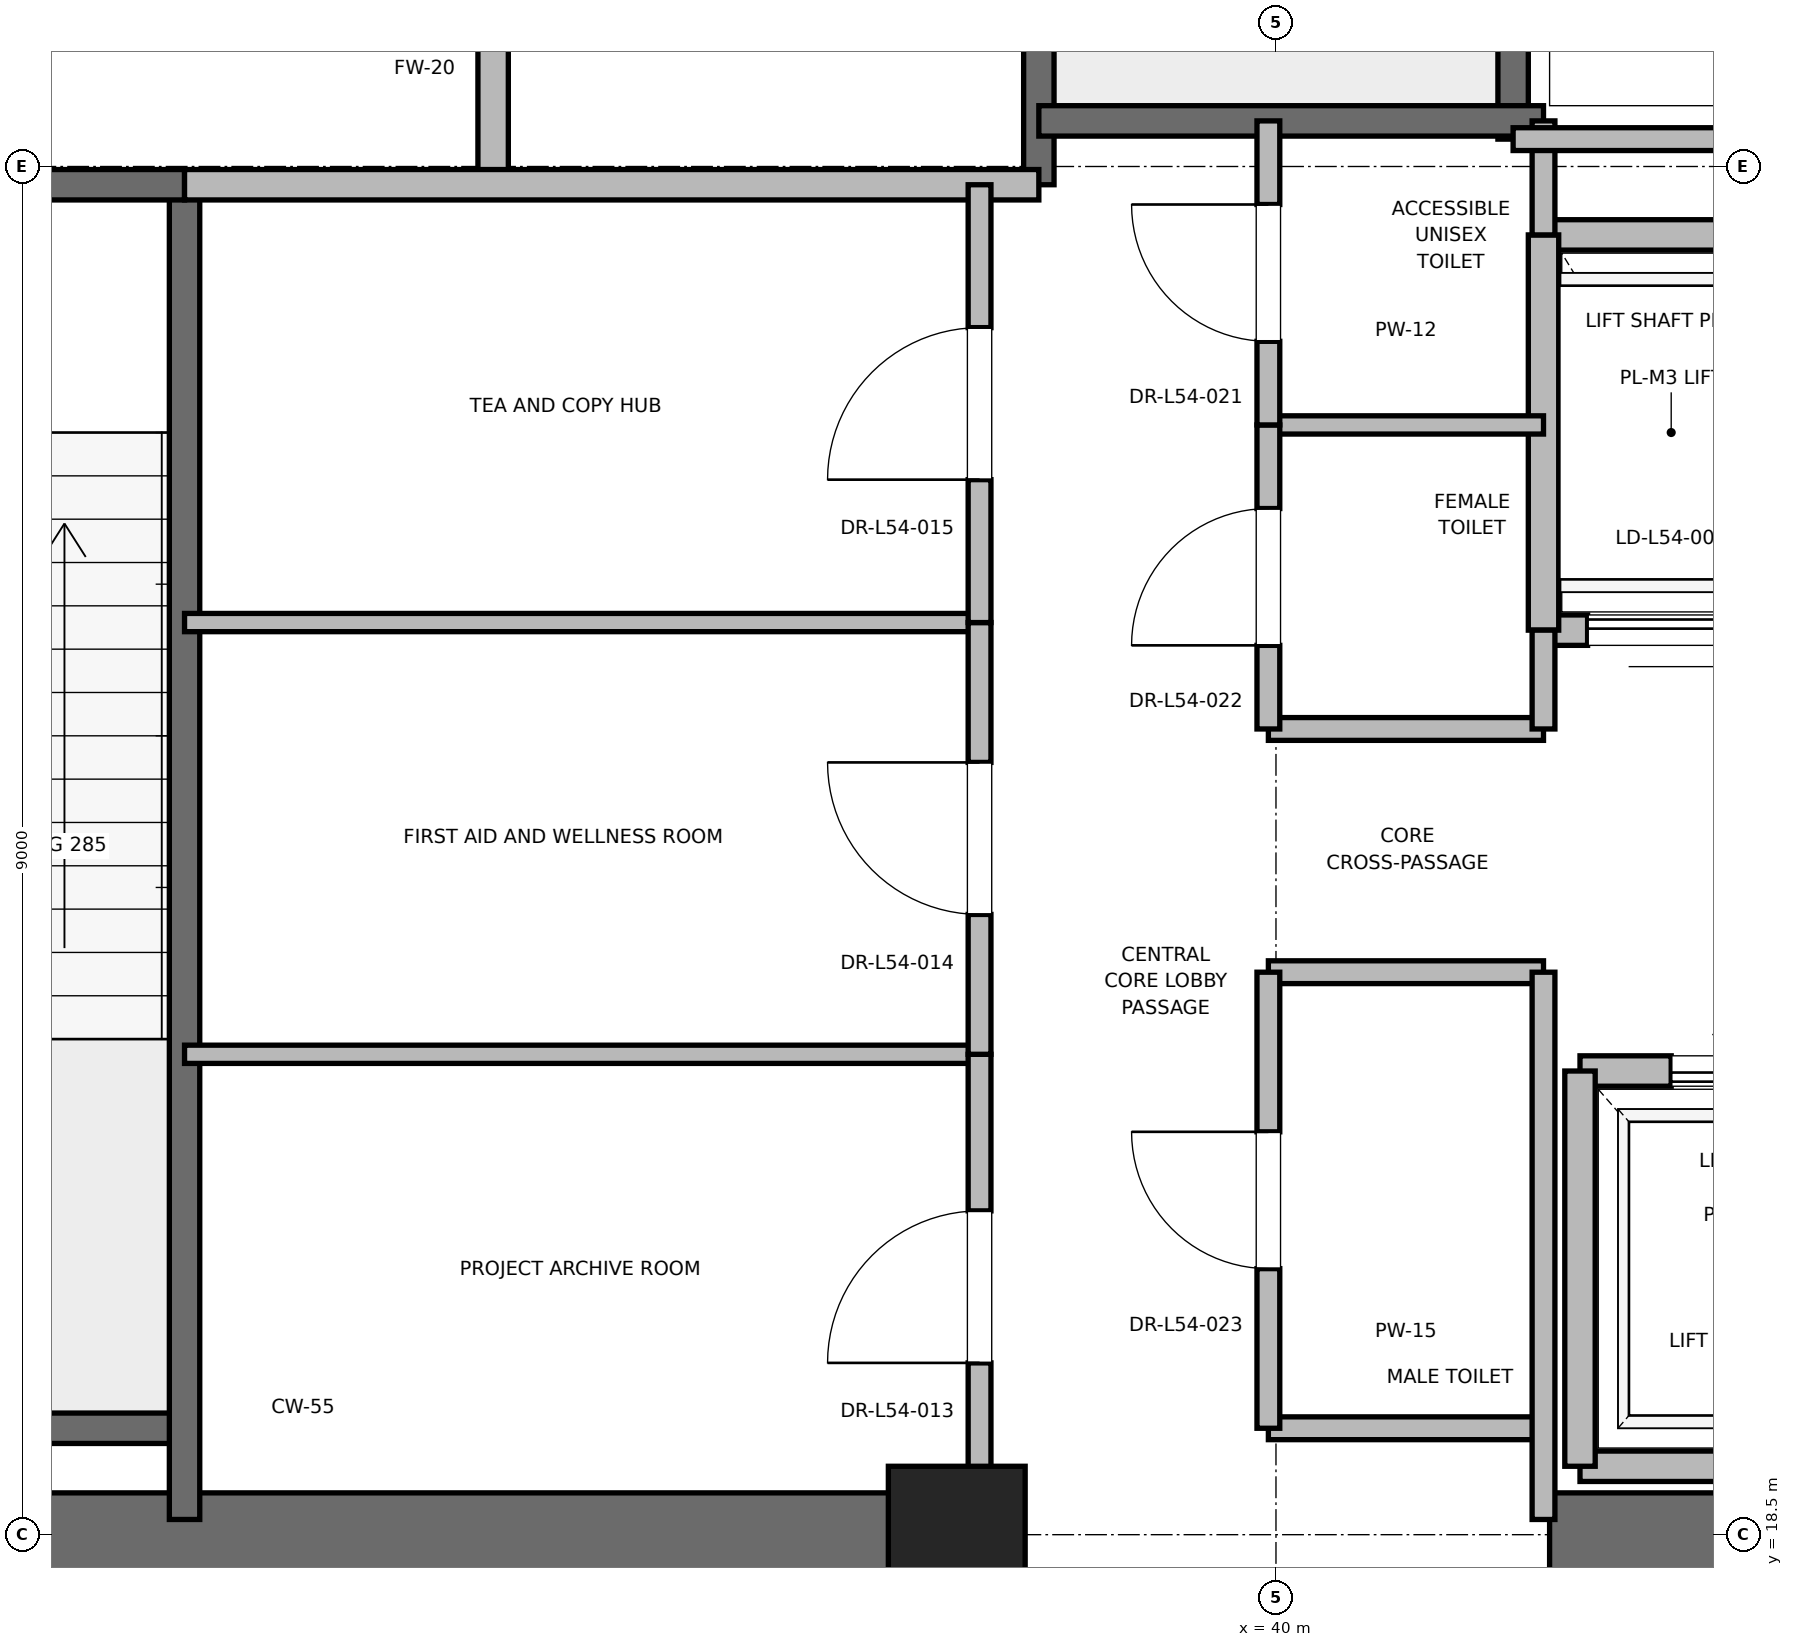
"""IFC4 building model, lengths in metres.
Left out: names, types, materials, properties, quantities, classifications, styles, units other than length and angle.
Written with IfcOpenShell. Run it as: python <this file> out.ifc"""

import sys

from ifc_helpers import new_model, si_unit, direction, frame, frame_2d, origin, origin_2d, place, context, subcontext, project, spatial, rectangle, extrude, element, fill, save


model = new_model("IFC4")
c1 = context("Model", 3, precision=1e-05, world=origin(), true_north=direction((0.0, 1.0)))
c2 = subcontext(c1, "Body", "Model", "MODEL_VIEW")
j1 = project(units=[si_unit("LENGTHUNIT", "METRE"), si_unit("PLANEANGLEUNIT", "RADIAN")], contexts=[c1])
p1 = place(None, origin())
s1 = spatial("IfcSite", under=j1, at=p1, CompositionType="ELEMENT")
p2 = place(p1, origin())
s2 = spatial("IfcBuilding", under=s1, at=p2, CompositionType="ELEMENT")
p3 = place(p2, frame((0.0, 0.0, 233.2)))
s3 = spatial("IfcBuildingStorey", under=s2, at=p3, CompositionType="ELEMENT", Elevation=233.2)
p4 = place(p3, frame((37.9, 18.5, 0.0), z_axis=(0.0, 0.0, 1.0), x_axis=(1.0, 0.0, 0.0)))
e1 = element("IfcColumn", 1, at=p4, inside=s3, PredefinedType="PILASTER", context=c2, shape_type="SweptSolid", body=[
    extrude(rectangle(XDim=0.9, YDim=0.9, at=origin_2d()), origin(), (0.0, 0.0, 1.0), 5.0),
])
for number, where, z_axis, x_axis in (
    (2, (29.0, 18.5, 0.0), (0.0, 0.0, 1.0), (1.0, 0.0, 0.0)),
    (3, (41.8, 18.5, 0.0), (0.0, 0.0, 1.0), (1.0, 0.0, 0.0)),
):
    element("IfcWall", number, at=place(p3, frame(where, z_axis=z_axis, x_axis=x_axis)), inside=s3, PredefinedType="SHEAR", context=c2, shape_type="SweptSolid", body=[
        extrude(rectangle(XDim=9.2, YDim=0.55, at=frame_2d((4.6, 0.0))), origin(), (0.0, 0.0, 1.0), 4.7),
    ])
p5 = place(p3, frame((29.7, 19.2, 0.0), z_axis=(0.0, 0.0, 1.0), x_axis=(1.0, 0.0, 0.0)))
e4 = element("IfcWall", 4, at=p5, inside=s3, PredefinedType="SOLIDWALL", context=c2, shape_type="SweptSolid", body=[
    extrude(rectangle(XDim=3.12, YDim=0.2, at=frame_2d((1.56, 0.0))), origin(), (0.0, 0.0, 1.0), 4.7),
])
p6 = place(p3, frame((32.82, 18.6, 0.0), z_axis=(0.0, 0.0, 1.0), x_axis=(0.0, 1.0, 0.0)))
e5 = element("IfcWall", 5, at=p6, inside=s3, PredefinedType="SOLIDWALL", context=c2, shape_type="SweptSolid", body=[
    extrude(rectangle(XDim=8.78, YDim=0.2, at=frame_2d((4.39, 0.0))), origin(), (0.0, 0.0, 1.0), 4.7),
])
p7 = place(p3, frame((29.7, 27.38, 0.0), z_axis=(0.0, 0.0, 1.0), x_axis=(1.0, 0.0, 0.0)))
e6 = element("IfcWall", 6, at=p7, inside=s3, PredefinedType="SOLIDWALL", context=c2, shape_type="SweptSolid", body=[
    extrude(rectangle(XDim=3.12, YDim=0.2, at=frame_2d((1.56, 0.0))), origin(), (0.0, 0.0, 1.0), 4.7),
])
p8 = place(p7, frame((1.01, 0.0, 0.0)))
e7 = element("IfcOpeningElement", 7, at=p8, cuts=e6, PredefinedType="OPENING", context=c2, shape_type="SweptSolid", body=[
    extrude(rectangle(XDim=1.1, YDim=2.15, at=frame_2d((0.55, 1.075))), frame((0.0, 0.1, 0.0), z_axis=(0.0, -1.0, 0.0), x_axis=(1.0, 0.0, 0.0)), (0.0, 0.0, 1.0), 0.2),
])
p9 = place(p3, frame((38.44, 27.38, 0.0), z_axis=(0.0, 0.0, 1.0), x_axis=(0.0, 1.0, 0.0)))
e8 = element("IfcWall", 8, at=p9, inside=s3, PredefinedType="SOLIDWALL", context=c2, shape_type="SweptSolid", body=[
    extrude(rectangle(XDim=8.87, YDim=0.2, at=frame_2d((4.435, 0.0))), origin(), (0.0, 0.0, 1.0), 4.7),
])
p10 = place(p3, frame((41.56, 27.68, 0.0), z_axis=(0.0, 0.0, 1.0), x_axis=(0.0, 1.0, 0.0)))
e9 = element("IfcWall", 9, at=p10, inside=s3, PredefinedType="SOLIDWALL", context=c2, shape_type="SweptSolid", body=[
    extrude(rectangle(XDim=8.57, YDim=0.2, at=frame_2d((4.285, 0.0))), origin(), (0.0, 0.0, 1.0), 4.7),
])
p11 = place(p3, frame((38.44, 27.8, 0.0), z_axis=(0.0, 0.0, 1.0), x_axis=(1.0, 0.0, 0.0)))
e10 = element("IfcWall", 10, at=p11, inside=s3, PredefinedType="SOLIDWALL", context=c2, shape_type="SweptSolid", body=[
    extrude(rectangle(XDim=3.32, YDim=0.2, at=frame_2d((1.66, 0.0))), origin(), (0.0, 0.0, 1.0), 4.7),
])
p12 = place(p3, frame((34.85, 27.38, 0.0), z_axis=(0.0, 0.0, 1.0), x_axis=(0.0, 1.0, 0.0)))
e11 = element("IfcWall", 11, at=p12, inside=s3, PredefinedType="PARTITIONING", context=c2, shape_type="SweptSolid", body=[
    extrude(rectangle(XDim=3.37, YDim=0.2, at=frame_2d((1.685, 0.0))), origin(), (0.0, 0.0, 1.0), 4.7),
])
p13 = place(p12, frame((1.11, 0.0, 0.0)))
e12 = element("IfcOpeningElement", 12, at=p13, cuts=e11, PredefinedType="OPENING", context=c2, shape_type="SweptSolid", body=[
    extrude(rectangle(XDim=1.15, YDim=2.2, at=frame_2d((0.575, 1.1))), frame((0.0, 0.1, 0.0), z_axis=(0.0, -1.0, 0.0), x_axis=(1.0, 0.0, 0.0)), (0.0, 0.0, 1.0), 0.2),
])
p14 = place(p3, frame((32.82, 27.38, 0.0), z_axis=(0.0, 0.0, 1.0), x_axis=(1.0, 0.0, 0.0)))
e13 = element("IfcWall", 13, at=p14, inside=s3, PredefinedType="PARTITIONING", context=c2, shape_type="SweptSolid", body=[
    extrude(rectangle(XDim=5.62, YDim=0.2, at=frame_2d((2.81, 0.0))), origin(), (0.0, 0.0, 1.0), 4.7),
])
p15 = place(p3, frame((42.0, 18.95, 0.0), z_axis=(0.0, 0.0, 1.0), x_axis=(1.0, 0.0, 0.0)))
e14 = element("IfcWall", 14, at=p15, inside=s3, PredefinedType="SOLIDWALL", context=c2, shape_type="SweptSolid", body=[
    extrude(rectangle(XDim=2.3, YDim=0.2, at=frame_2d((1.15, 0.0))), origin(), (0.0, 0.0, 1.0), 3.68),
])
p16 = place(p3, frame((44.3, 21.55, 0.0), z_axis=(0.0, 0.0, 1.0), x_axis=(-1.0, 0.0, 0.0)))
e15 = element("IfcWall", 15, at=p16, inside=s3, PredefinedType="SOLIDWALL", context=c2, shape_type="SweptSolid", body=[
    extrude(rectangle(XDim=2.3, YDim=0.2, at=frame_2d((1.15, 0.0))), origin(), (0.0, 0.0, 1.0), 4.7),
])
p17 = place(p16, frame((0.6, 0.0, 0.0)))
e16 = element("IfcOpeningElement", 16, at=p17, cuts=e15, PredefinedType="OPENING", context=c2, shape_type="SweptSolid", body=[
    extrude(rectangle(XDim=1.1, YDim=2.2, at=frame_2d((0.55, 1.1))), frame((0.0, 0.1, 0.0), z_axis=(0.0, -1.0, 0.0), x_axis=(1.0, 0.0, 0.0)), (0.0, 0.0, 1.0), 0.2),
])
p18 = place(p3, frame((42.0, 21.55, 0.0), z_axis=(0.0, 0.0, 1.0), x_axis=(0.0, -1.0, 0.0)))
e17 = element("IfcWall", 17, at=p18, inside=s3, PredefinedType="SOLIDWALL", context=c2, shape_type="SweptSolid", body=[
    extrude(rectangle(XDim=2.6, YDim=0.2, at=frame_2d((1.3, 0.0))), origin(), (0.0, 0.0, 1.0), 3.68),
])
p19 = place(p3, frame((41.76, 24.45, 0.0), z_axis=(0.0, 0.0, 1.0), x_axis=(1.0, 0.0, 0.0)))
e18 = element("IfcWall", 18, at=p19, inside=s3, PredefinedType="SOLIDWALL", context=c2, shape_type="SweptSolid", body=[
    extrude(rectangle(XDim=1.68, YDim=0.2, at=frame_2d((0.84, 0.0))), origin(), (0.0, 0.0, 1.0), 4.7),
])
p20 = place(p19, frame((0.29, 0.0, 0.0)))
e19 = element("IfcOpeningElement", 19, at=p20, cuts=e18, PredefinedType="OPENING", context=c2, shape_type="SweptSolid", body=[
    extrude(rectangle(XDim=1.1, YDim=2.2, at=frame_2d((0.55, 1.1))), frame((0.0, 0.1, 0.0), z_axis=(0.0, -1.0, 0.0), x_axis=(1.0, 0.0, 0.0)), (0.0, 0.0, 1.0), 0.2),
])
p21 = place(p3, frame((43.44, 27.05, 0.0), z_axis=(0.0, 0.0, 1.0), x_axis=(-1.0, 0.0, 0.0)))
e20 = element("IfcWall", 20, at=p21, inside=s3, PredefinedType="SOLIDWALL", context=c2, shape_type="SweptSolid", body=[
    extrude(rectangle(XDim=1.68, YDim=0.2, at=frame_2d((0.84, 0.0))), origin(), (0.0, 0.0, 1.0), 4.7),
])
p22 = place(p3, frame((41.76, 27.05, 0.0), z_axis=(0.0, 0.0, 1.0), x_axis=(0.0, -1.0, 0.0)))
e21 = element("IfcWall", 21, at=p22, inside=s3, PredefinedType="SOLIDWALL", context=c2, shape_type="SweptSolid", body=[
    extrude(rectangle(XDim=2.6, YDim=0.2, at=frame_2d((1.3, 0.0))), origin(), (0.0, 0.0, 1.0), 4.7),
])
for number, where, z_axis, x_axis in (
    (22, (39.95, 19.2, 0.0), (0.0, 0.0, 1.0), (1.0, 0.0, 0.0)),
    (23, (39.95, 22.2, 0.0), (0.0, 0.0, 1.0), (1.0, 0.0, 0.0)),
    (24, (39.95, 23.8, 0.0), (0.0, 0.0, 1.0), (1.0, 0.0, 0.0)),
):
    element("IfcWall", number, at=place(p3, frame(where, z_axis=z_axis, x_axis=x_axis)), inside=s3, PredefinedType="PARTITIONING", context=c2, shape_type="SweptSolid", body=[
        extrude(rectangle(XDim=1.81, YDim=0.15, at=frame_2d((0.905, 0.0))), origin(), (0.0, 0.0, 1.0), 2.85),
    ])
p23 = place(p3, frame((39.95, 25.8, 0.0), z_axis=(0.0, 0.0, 1.0), x_axis=(1.0, 0.0, 0.0)))
e25 = element("IfcWall", 25, at=p23, inside=s3, PredefinedType="PARTITIONING", context=c2, shape_type="SweptSolid", body=[
    extrude(rectangle(XDim=1.81, YDim=0.12, at=frame_2d((0.905, 0.0))), origin(), (0.0, 0.0, 1.0), 2.85),
])
p24 = place(p3, frame((41.76, 18.6, 0.0), z_axis=(0.0, 0.0, 1.0), x_axis=(0.0, 1.0, 0.0)))
e26 = element("IfcWall", 26, at=p24, inside=s3, PredefinedType="PARTITIONING", context=c2, shape_type="SweptSolid", body=[
    extrude(rectangle(XDim=3.6, YDim=0.15, at=frame_2d((1.8, 0.0))), origin(), (0.0, 0.0, 1.0), 2.85),
])
p25 = place(p3, frame((41.76, 23.8, 0.0), z_axis=(0.0, 0.0, 1.0), x_axis=(0.0, 1.0, 0.0)))
e27 = element("IfcWall", 27, at=p25, inside=s3, PredefinedType="PARTITIONING", context=c2, shape_type="SweptSolid", body=[
    extrude(rectangle(XDim=0.65, YDim=0.15, at=frame_2d((0.325, 0.0))), origin(), (0.0, 0.0, 1.0), 2.85),
])
p26 = place(p3, frame((41.76, 27.05, 0.0), z_axis=(0.0, 0.0, 1.0), x_axis=(0.0, 1.0, 0.0)))
e28 = element("IfcWall", 28, at=p26, inside=s3, PredefinedType="PARTITIONING", context=c2, shape_type="SweptSolid", body=[
    extrude(rectangle(XDim=0.75, YDim=0.15, at=frame_2d((0.375, 0.0))), origin(), (0.0, 0.0, 1.0), 2.85),
])
p27 = place(p3, frame((39.95, 19.2, 0.0), z_axis=(0.0, 0.0, 1.0), x_axis=(0.0, 1.0, 0.0)))
e29 = element("IfcWall", 29, at=p27, inside=s3, PredefinedType="PARTITIONING", context=c2, shape_type="SweptSolid", body=[
    extrude(rectangle(XDim=3.0, YDim=0.15, at=frame_2d((1.5, 0.0))), origin(), (0.0, 0.0, 1.0), 2.85),
])
p28 = place(p27, frame((1.05, 0.0, 0.0)))
e30 = element("IfcOpeningElement", 30, at=p28, cuts=e29, PredefinedType="OPENING", context=c2, shape_type="SweptSolid", body=[
    extrude(rectangle(XDim=0.9, YDim=2.1, at=frame_2d((0.45, 1.05))), frame((0.0, 0.075, 0.0), z_axis=(0.0, -1.0, 0.0), x_axis=(1.0, 0.0, 0.0)), (0.0, 0.0, 1.0), 0.15),
])
p29 = place(p3, frame((39.95, 23.8, 0.0), z_axis=(0.0, 0.0, 1.0), x_axis=(0.0, 1.0, 0.0)))
e31 = element("IfcWall", 31, at=p29, inside=s3, PredefinedType="PARTITIONING", context=c2, shape_type="SweptSolid", body=[
    extrude(rectangle(XDim=2.0, YDim=0.15, at=frame_2d((1.0, 0.0))), origin(), (0.0, 0.0, 1.0), 2.85),
])
p30 = place(p29, frame((0.55, 0.0, 0.0)))
e32 = element("IfcOpeningElement", 32, at=p30, cuts=e31, PredefinedType="OPENING", context=c2, shape_type="SweptSolid", body=[
    extrude(rectangle(XDim=0.9, YDim=2.1, at=frame_2d((0.45, 1.05))), frame((0.0, 0.075, 0.0), z_axis=(0.0, -1.0, 0.0), x_axis=(1.0, 0.0, 0.0)), (0.0, 0.0, 1.0), 0.15),
])
p31 = place(p3, frame((39.95, 25.8, 0.0), z_axis=(0.0, 0.0, 1.0), x_axis=(0.0, 1.0, 0.0)))
e33 = element("IfcWall", 33, at=p31, inside=s3, PredefinedType="PARTITIONING", context=c2, shape_type="SweptSolid", body=[
    extrude(rectangle(XDim=2.0, YDim=0.15, at=frame_2d((1.0, 0.0))), origin(), (0.0, 0.0, 1.0), 2.85),
])
p32 = place(p31, frame((0.55, 0.0, 0.0)))
e34 = element("IfcOpeningElement", 34, at=p32, cuts=e33, PredefinedType="OPENING", context=c2, shape_type="SweptSolid", body=[
    extrude(rectangle(XDim=0.9, YDim=2.1, at=frame_2d((0.45, 1.05))), frame((0.0, 0.075, 0.0), z_axis=(0.0, -1.0, 0.0), x_axis=(1.0, 0.0, 0.0)), (0.0, 0.0, 1.0), 0.15),
])
for number, where, z_axis, x_axis in (
    (35, (32.82, 21.66, 0.0), (0.0, 0.0, 1.0), (1.0, 0.0, 0.0)),
    (36, (32.82, 24.5, 0.0), (0.0, 0.0, 1.0), (1.0, 0.0, 0.0)),
):
    element("IfcWall", number, at=place(p3, frame(where, z_axis=z_axis, x_axis=x_axis)), inside=s3, PredefinedType="PARTITIONING", context=c2, shape_type="SweptSolid", body=[
        extrude(rectangle(XDim=5.23, YDim=0.12, at=frame_2d((2.615, 0.0))), origin(), (0.0, 0.0, 1.0), 2.85),
    ])
p33 = place(p3, frame((38.05, 18.6, 0.0), z_axis=(0.0, 0.0, 1.0), x_axis=(0.0, 1.0, 0.0)))
e37 = element("IfcWall", 37, at=p33, inside=s3, PredefinedType="PARTITIONING", context=c2, shape_type="SweptSolid", body=[
    extrude(rectangle(XDim=3.06, YDim=0.15, at=frame_2d((1.53, 0.0))), origin(), (0.0, 0.0, 1.0), 2.85),
])
p34 = place(p33, frame((1.03, 0.0, 0.0)))
e38 = element("IfcOpeningElement", 38, at=p34, cuts=e37, PredefinedType="OPENING", context=c2, shape_type="SweptSolid", body=[
    extrude(rectangle(XDim=1.0, YDim=2.15, at=frame_2d((0.5, 1.075))), frame((0.0, 0.075, 0.0), z_axis=(0.0, -1.0, 0.0), x_axis=(1.0, 0.0, 0.0)), (0.0, 0.0, 1.0), 0.15),
])
p35 = place(p3, frame((38.05, 21.66, 0.0), z_axis=(0.0, 0.0, 1.0), x_axis=(0.0, 1.0, 0.0)))
e39 = element("IfcWall", 39, at=p35, inside=s3, PredefinedType="PARTITIONING", context=c2, shape_type="SweptSolid", body=[
    extrude(rectangle(XDim=2.84, YDim=0.15, at=frame_2d((1.42, 0.0))), origin(), (0.0, 0.0, 1.0), 2.85),
])
p36 = place(p35, frame((0.92, 0.0, 0.0)))
e40 = element("IfcOpeningElement", 40, at=p36, cuts=e39, PredefinedType="OPENING", context=c2, shape_type="SweptSolid", body=[
    extrude(rectangle(XDim=1.0, YDim=2.15, at=frame_2d((0.5, 1.075))), frame((0.0, 0.075, 0.0), z_axis=(0.0, -1.0, 0.0), x_axis=(1.0, 0.0, 0.0)), (0.0, 0.0, 1.0), 0.15),
])
p37 = place(p3, frame((38.05, 24.5, 0.0), z_axis=(0.0, 0.0, 1.0), x_axis=(0.0, 1.0, 0.0)))
e41 = element("IfcWall", 41, at=p37, inside=s3, PredefinedType="PARTITIONING", context=c2, shape_type="SweptSolid", body=[
    extrude(rectangle(XDim=2.88, YDim=0.15, at=frame_2d((1.44, 0.0))), origin(), (0.0, 0.0, 1.0), 2.85),
])
p38 = place(p37, frame((0.94, 0.0, 0.0)))
e42 = element("IfcOpeningElement", 42, at=p38, cuts=e41, PredefinedType="OPENING", context=c2, shape_type="SweptSolid", body=[
    extrude(rectangle(XDim=1.0, YDim=2.15, at=frame_2d((0.5, 1.075))), frame((0.0, 0.075, 0.0), z_axis=(0.0, -1.0, 0.0), x_axis=(1.0, 0.0, 0.0)), (0.0, 0.0, 1.0), 0.15),
])
p39 = place(p3, frame((41.56, 27.68, 0.0), z_axis=(0.0, 0.0, 1.0), x_axis=(1.0, 0.0, 0.0)))
e43 = element("IfcWall", 43, at=p39, inside=s3, PredefinedType="PARTITIONING", context=c2, shape_type="SweptSolid", body=[
    extrude(rectangle(XDim=3.59, YDim=0.15, at=frame_2d((1.795, 0.0))), origin(), (0.0, 0.0, 1.0), 2.85),
])
p40 = place(p17, origin())
e44 = element("IfcDoor", 44, at=p40, inside=s3, OperationType="SLIDING_TO_RIGHT", PredefinedType="DOOR", context=c2, shape_type="SweptSolid", body=[
    extrude(rectangle(XDim=1.1, YDim=2.2, at=frame_2d((0.55, 1.1))), frame((0.0, 0.025, 0.0), z_axis=(0.0, -1.0, 0.0), x_axis=(1.0, 0.0, 0.0)), (0.0, 0.0, 1.0), 0.05),
])
fill(e16, e44)
p41 = place(p20, origin())
e45 = element("IfcDoor", 45, at=p41, inside=s3, OperationType="SLIDING_TO_RIGHT", PredefinedType="DOOR", context=c2, shape_type="SweptSolid", body=[
    extrude(rectangle(XDim=1.1, YDim=2.2, at=frame_2d((0.55, 1.1))), frame((0.0, 0.025, 0.0), z_axis=(0.0, -1.0, 0.0), x_axis=(1.0, 0.0, 0.0)), (0.0, 0.0, 1.0), 0.05),
])
fill(e19, e45)
p42 = place(p28, origin())
e46 = element("IfcDoor", 46, at=p42, inside=s3, OperationType="SINGLE_SWING_RIGHT", PredefinedType="DOOR", context=c2, shape_type="SweptSolid", body=[
    extrude(rectangle(XDim=0.9, YDim=2.1, at=frame_2d((0.45, 1.05))), frame((0.0, 0.025, 0.0), z_axis=(0.0, -1.0, 0.0), x_axis=(1.0, 0.0, 0.0)), (0.0, 0.0, 1.0), 0.05),
])
fill(e30, e46)
p43 = place(p30, origin())
e47 = element("IfcDoor", 47, at=p43, inside=s3, OperationType="SINGLE_SWING_LEFT", PredefinedType="DOOR", context=c2, shape_type="SweptSolid", body=[
    extrude(rectangle(XDim=0.9, YDim=2.1, at=frame_2d((0.45, 1.05))), frame((0.0, 0.025, 0.0), z_axis=(0.0, -1.0, 0.0), x_axis=(1.0, 0.0, 0.0)), (0.0, 0.0, 1.0), 0.05),
])
fill(e32, e47)
p44 = place(p32, origin())
e48 = element("IfcDoor", 48, at=p44, inside=s3, OperationType="SINGLE_SWING_RIGHT", PredefinedType="DOOR", context=c2, shape_type="SweptSolid", body=[
    extrude(rectangle(XDim=0.9, YDim=2.1, at=frame_2d((0.45, 1.05))), frame((0.0, 0.025, 0.0), z_axis=(0.0, -1.0, 0.0), x_axis=(1.0, 0.0, 0.0)), (0.0, 0.0, 1.0), 0.05),
])
fill(e34, e48)
p45 = place(p34, origin())
e49 = element("IfcDoor", 49, at=p45, inside=s3, OperationType="SINGLE_SWING_LEFT", PredefinedType="DOOR", context=c2, shape_type="SweptSolid", body=[
    extrude(rectangle(XDim=1.0, YDim=2.15, at=frame_2d((0.5, 1.075))), frame((0.0, 0.025, 0.0), z_axis=(0.0, -1.0, 0.0), x_axis=(1.0, 0.0, 0.0)), (0.0, 0.0, 1.0), 0.05),
])
fill(e38, e49)
p46 = place(p36, origin())
e50 = element("IfcDoor", 50, at=p46, inside=s3, OperationType="SINGLE_SWING_RIGHT", PredefinedType="DOOR", context=c2, shape_type="SweptSolid", body=[
    extrude(rectangle(XDim=1.0, YDim=2.15, at=frame_2d((0.5, 1.075))), frame((0.0, 0.025, 0.0), z_axis=(0.0, -1.0, 0.0), x_axis=(1.0, 0.0, 0.0)), (0.0, 0.0, 1.0), 0.05),
])
fill(e40, e50)
p47 = place(p38, origin())
e51 = element("IfcDoor", 51, at=p47, inside=s3, OperationType="SINGLE_SWING_LEFT", PredefinedType="DOOR", context=c2, shape_type="SweptSolid", body=[
    extrude(rectangle(XDim=1.0, YDim=2.15, at=frame_2d((0.5, 1.075))), frame((0.0, 0.025, 0.0), z_axis=(0.0, -1.0, 0.0), x_axis=(1.0, 0.0, 0.0)), (0.0, 0.0, 1.0), 0.05),
])
fill(e42, e51)
save(model, sys.argv[1])
